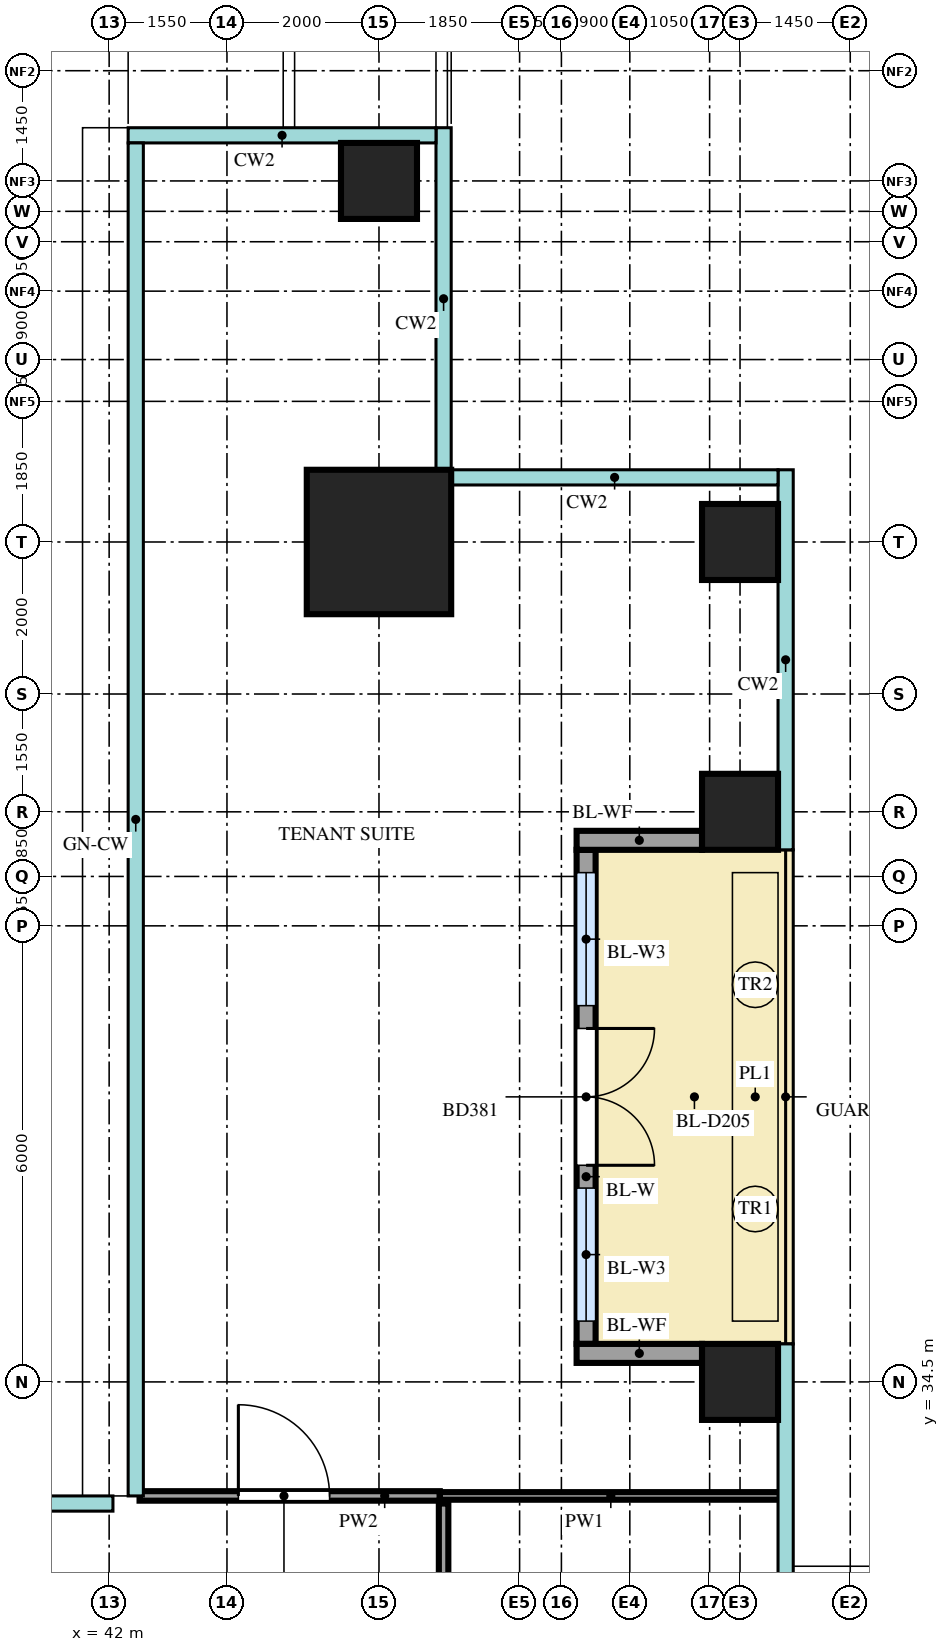
"""IFC4 building model, lengths in metres.
Left out: names, types, materials, properties, quantities, classifications, styles, units other than length and angle.
Written with IfcOpenShell. Run it as: python <this file> out.ifc"""

import sys

from ifc_helpers import new_model, si_unit, direction, frame, frame_2d, origin, origin_2d, place, context, subcontext, project, spatial, rectangle, extrude, source, transform, mapped, element, fill, save


model = new_model("IFC4")
c1 = context("Model", 3, precision=1e-05, world=origin(), true_north=direction((0.0, 1.0)))
c2 = subcontext(c1, "Body", "Model", "MODEL_VIEW")
j1 = project(units=[si_unit("LENGTHUNIT", "METRE"), si_unit("PLANEANGLEUNIT", "RADIAN")], contexts=[c1])
p1 = place(None, origin())
s1 = spatial("IfcSite", under=j1, at=p1, CompositionType="ELEMENT")
p2 = place(p1, origin())
s2 = spatial("IfcBuilding", under=s1, at=p2, CompositionType="ELEMENT")
p3 = place(p2, frame((0.0, 0.0, 176.7)))
s3 = spatial("IfcBuildingStorey", under=s2, at=p3, CompositionType="ELEMENT", Elevation=176.7)
m1 = source(origin(), c2, "Body", "SweptSolid", [
    extrude(rectangle(XDim=1.9, YDim=1.9, at=origin_2d()), origin(), (0.0, 0.0, 1.0), 4.0),
])
p4 = place(p3, frame((45.55, 45.55, 0.0), z_axis=(0.0, 0.0, 1.0), x_axis=(1.0, 0.0, 0.0)))
e1 = element("IfcColumn", 1, at=p4, inside=s3, PredefinedType="COLUMN", context=c2, shape_type="MappedRepresentation", body=[
    mapped(m1, transform((0.0, 0.0, 0.0))),
])
m2 = source(origin(), c2, "Body", "SweptSolid", [
    extrude(rectangle(XDim=1.0, YDim=1.0, at=origin_2d()), origin(), (0.0, 0.0, 1.0), 3.75),
])
for number, where, z_axis, x_axis in (
    (2, (50.3, 34.5, 0.0), (0.0, 0.0, 1.0), (1.0, 0.0, 0.0)),
    (3, (50.3, 42.0, 0.0), (0.0, 0.0, 1.0), (1.0, 0.0, 0.0)),
    (4, (50.3, 45.55, 0.0), (0.0, 0.0, 1.0), (1.0, 0.0, 0.0)),
    (5, (45.55, 50.3, 0.0), (0.0, 0.0, 1.0), (1.0, 0.0, 0.0)),
):
    element("IfcColumn", number, at=place(p3, frame(where, z_axis=z_axis, x_axis=x_axis)), inside=s3, PredefinedType="COLUMN", context=c2, shape_type="MappedRepresentation", body=[
        mapped(m2, transform((0.0, 0.0, 0.0))),
    ])
m3 = source(origin(), c2, "Body", "SweptSolid", [
    extrude(rectangle(XDim=6.5, YDim=0.25, at=frame_2d((3.25, 0.0))), origin(), (0.0, 0.0, 1.0), 3.75),
])
p5 = place(p3, frame((48.275, 35.0, 0.0), z_axis=(0.0, 0.0, 1.0), x_axis=(0.0, 1.0, 0.0)))
e6 = element("IfcWall", 6, at=p5, inside=s3, PredefinedType="SOLIDWALL", context=c2, shape_type="MappedRepresentation", body=[
    mapped(m3, transform((0.0, 0.0, 0.0))),
])
m4 = source(origin(), c2, "Body", "SweptSolid", [
    extrude(rectangle(XDim=1.75, YDim=2.4, at=frame_2d((0.875, 1.2))), frame((0.0, 0.135, 0.0), z_axis=(0.0, -1.0, 0.0), x_axis=(1.0, 0.0, 0.0)), (0.0, 0.0, 1.0), 0.27),
])
p6 = place(p5, frame((0.3, 0.0, 0.0)))
e7 = element("IfcOpeningElement", 7, at=p6, cuts=e6, PredefinedType="OPENING", context=c2, shape_type="MappedRepresentation", body=[
    mapped(m4, transform((0.0, 0.0, 0.0))),
])
p7 = place(p5, frame((4.45, 0.0, 0.0)))
e8 = element("IfcOpeningElement", 8, at=p7, cuts=e6, PredefinedType="OPENING", context=c2, shape_type="MappedRepresentation", body=[
    mapped(m4, transform((0.0, 0.0, 0.0))),
])
m5 = source(origin(), c2, "Body", "SweptSolid", [
    extrude(rectangle(XDim=1.8, YDim=2.4, at=frame_2d((0.9, 1.2))), frame((0.0, 0.135, 0.0), z_axis=(0.0, -1.0, 0.0), x_axis=(1.0, 0.0, 0.0)), (0.0, 0.0, 1.0), 0.27),
])
p8 = place(p5, frame((2.35, 0.0, 0.0)))
e9 = element("IfcOpeningElement", 9, at=p8, cuts=e6, PredefinedType="OPENING", context=c2, shape_type="MappedRepresentation", body=[
    mapped(m5, transform((0.0, 0.0, 0.0))),
])
m6 = source(origin(), c2, "Body", "SweptSolid", [
    extrude(rectangle(XDim=1.65, YDim=0.25, at=frame_2d((0.825, 0.0))), origin(), (0.0, 0.0, 1.0), 3.45),
])
for number, where, z_axis, x_axis in (
    (10, (49.8, 34.875, 0.0), (0.0, 0.0, 1.0), (-1.0, 0.0, 0.0)),
    (11, (49.8, 41.625, 0.0), (0.0, 0.0, 1.0), (-1.0, 0.0, 0.0)),
):
    element("IfcWall", number, at=place(p3, frame(where, z_axis=z_axis, x_axis=x_axis)), inside=s3, PredefinedType="SOLIDWALL", context=c2, shape_type="MappedRepresentation", body=[
        mapped(m6, transform((0.0, 0.0, 0.0))),
    ])
m7 = source(origin(), c2, "Body", "SweptSolid", [
    extrude(rectangle(XDim=3.2, YDim=0.125, at=frame_2d((1.6, 0.0))), origin(), (0.0, 0.0, 1.0), 3.8),
])
p9 = place(p3, frame((46.4, 29.7, 0.0), z_axis=(0.0, 0.0, 1.0), x_axis=(0.0, 1.0, 0.0)))
e12 = element("IfcWall", 12, at=p9, inside=s3, PredefinedType="PARTITIONING", context=c2, shape_type="MappedRepresentation", body=[
    mapped(m7, transform((0.0, 0.0, 0.0))),
])
m8 = source(origin(), c2, "Body", "SweptSolid", [
    extrude(rectangle(XDim=0.9, YDim=2.1, at=frame_2d((0.45, 1.05))), frame((0.0, 0.073, 0.0), z_axis=(0.0, -1.0, 0.0), x_axis=(1.0, 0.0, 0.0)), (0.0, 0.0, 1.0), 0.145),
])
p10 = place(p9, frame((1.15, 0.0, 0.0)))
e13 = element("IfcOpeningElement", 13, at=p10, cuts=e12, PredefinedType="OPENING", context=c2, shape_type="MappedRepresentation", body=[
    mapped(m8, transform((0.0, 0.0, 0.0))),
])
m9 = source(origin(), c2, "Body", "SweptSolid", [
    extrude(rectangle(XDim=3.95, YDim=0.125, at=frame_2d((1.975, 0.0))), origin(), (0.0, 0.0, 1.0), 3.8),
])
p11 = place(p3, frame((42.4, 33.0, 0.0), z_axis=(0.0, 0.0, 1.0), x_axis=(1.0, 0.0, 0.0)))
e14 = element("IfcWall", 14, at=p11, inside=s3, PredefinedType="PARTITIONING", context=c2, shape_type="MappedRepresentation", body=[
    mapped(m9, transform((0.0, 0.0, 0.0))),
])
m10 = source(origin(), c2, "Body", "SweptSolid", [
    extrude(rectangle(XDim=1.2, YDim=2.1, at=frame_2d((0.6, 1.05))), frame((0.0, 0.073, 0.0), z_axis=(0.0, -1.0, 0.0), x_axis=(1.0, 0.0, 0.0)), (0.0, 0.0, 1.0), 0.145),
])
p12 = place(p11, frame((1.3, 0.0, 0.0)))
e15 = element("IfcOpeningElement", 15, at=p12, cuts=e14, PredefinedType="OPENING", context=c2, shape_type="MappedRepresentation", body=[
    mapped(m10, transform((0.0, 0.0, 0.0))),
])
m11 = source(origin(), c2, "Body", "SweptSolid", [
    extrude(rectangle(XDim=4.5, YDim=0.1, at=frame_2d((2.25, 0.0))), origin(), (0.0, 0.0, 1.0), 3.8),
])
p13 = place(p3, frame((46.35, 33.0, 0.0), z_axis=(0.0, 0.0, 1.0), x_axis=(1.0, 0.0, 0.0)))
e16 = element("IfcWall", 16, at=p13, inside=s3, PredefinedType="PARTITIONING", context=c2, shape_type="MappedRepresentation", body=[
    mapped(m11, transform((0.0, 0.0, 0.0))),
])
m12 = source(origin(), c2, "Body", "SweptSolid", [
    extrude(rectangle(XDim=1.75, YDim=2.4, at=frame_2d((0.875, 1.2))), frame((0.0, 0.03, 0.0), z_axis=(0.0, -1.0, 0.0), x_axis=(1.0, 0.0, 0.0)), (0.0, 0.0, 1.0), 0.06),
])
p14 = place(p6, origin())
e17 = element("IfcWindow", 17, at=p14, inside=s3, PartitioningType="SINGLE_PANEL", PredefinedType="WINDOW", context=c2, shape_type="MappedRepresentation", body=[
    mapped(m12, transform((0.0, 0.0, 0.0))),
])
fill(e7, e17)
p15 = place(p7, origin())
e18 = element("IfcWindow", 18, at=p15, inside=s3, PartitioningType="SINGLE_PANEL", PredefinedType="WINDOW", context=c2, shape_type="MappedRepresentation", body=[
    mapped(m12, transform((0.0, 0.0, 0.0))),
])
fill(e8, e18)
m13 = source(origin(), c2, "Body", "SweptSolid", [
    extrude(rectangle(XDim=1.8, YDim=2.4, at=frame_2d((0.9, 1.2))), frame((0.0, 0.025, 0.0), z_axis=(0.0, -1.0, 0.0), x_axis=(1.0, 0.0, 0.0)), (0.0, 0.0, 1.0), 0.05),
])
p16 = place(p8, origin())
e19 = element("IfcDoor", 19, at=p16, inside=s3, OperationType="DOUBLE_DOOR_DOUBLE_SWING", PredefinedType="DOOR", context=c2, shape_type="MappedRepresentation", body=[
    mapped(m13, transform((0.0, 0.0, 0.0))),
])
fill(e9, e19)
m14 = source(origin(), c2, "Body", "SweptSolid", [
    extrude(rectangle(XDim=1.2, YDim=2.1, at=frame_2d((0.6, 1.05))), frame((0.0, 0.025, 0.0), z_axis=(0.0, -1.0, 0.0), x_axis=(1.0, 0.0, 0.0)), (0.0, 0.0, 1.0), 0.05),
])
p17 = place(p12, origin())
e20 = element("IfcDoor", 20, at=p17, inside=s3, OperationType="SINGLE_SWING_RIGHT", PredefinedType="DOOR", context=c2, shape_type="MappedRepresentation", body=[
    mapped(m14, transform((0.0, 0.0, 0.0))),
])
fill(e15, e20)
save(model, sys.argv[1])
